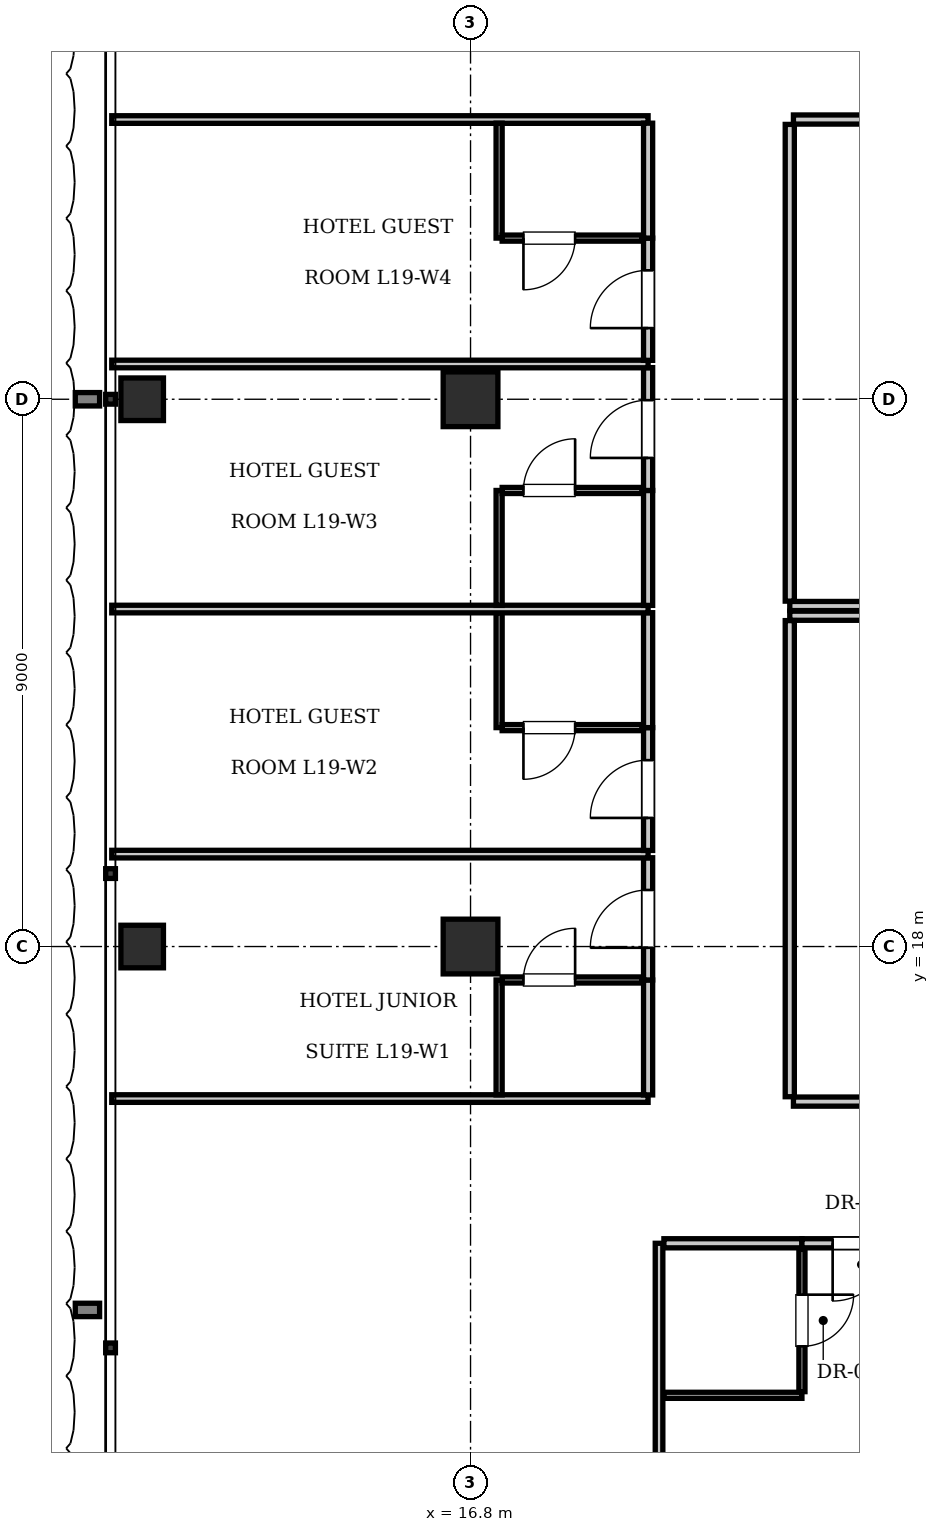
"""IFC4 building model, lengths in metres.
Left out: names, types, materials, properties, quantities, classifications, styles, units other than length and angle.
Written with IfcOpenShell. Run it as: python <this file> out.ifc"""

import sys

from ifc_helpers import new_model, si_unit, direction, frame, frame_2d, origin, origin_2d, place, context, subcontext, project, spatial, rectangle, i_section, extrude, element, fill, save


model = new_model("IFC4")
c1 = context("Model", 3, precision=1e-05, world=origin(), true_north=direction((0.0, 1.0)))
c2 = subcontext(c1, "Body", "Model", "MODEL_VIEW")
j1 = project(units=[si_unit("LENGTHUNIT", "METRE"), si_unit("PLANEANGLEUNIT", "RADIAN")], contexts=[c1])
p1 = place(None, origin())
s1 = spatial("IfcSite", under=j1, at=p1, CompositionType="ELEMENT")
p2 = place(p1, origin())
s2 = spatial("IfcBuilding", under=s1, at=p2, CompositionType="ELEMENT")
p3 = place(p2, frame((0.0, 0.0, 80.85)))
s3 = spatial("IfcBuildingStorey", under=s2, at=p3, CompositionType="ELEMENT", Elevation=80.85)
for number, where, z_axis, x_axis in (
    (1, (16.8, 18.0, 0.0), (0.0, 0.0, 1.0), (1.0, 0.0, 0.0)),
    (2, (16.8, 27.0, 0.0), (0.0, 0.0, 1.0), (1.0, 0.0, 0.0)),
):
    element("IfcColumn", number, at=place(p3, frame(where, z_axis=z_axis, x_axis=x_axis)), inside=s3, PredefinedType="COLUMN", context=c2, shape_type="SweptSolid", body=[
        extrude(rectangle(XDim=0.9, YDim=0.9, at=origin_2d()), origin(), (0.0, 0.0, 1.0), 3.85),
    ])
for number, where, z_axis, x_axis in (
    (3, (11.4, 18.0, 0.0), (0.0, 0.0, 1.0), (1.0, 0.0, 0.0)),
    (4, (11.4, 27.0, 0.0), (0.0, 0.0, 1.0), (1.0, 0.0, 0.0)),
):
    element("IfcColumn", number, at=place(p3, frame(where, z_axis=z_axis, x_axis=x_axis)), inside=s3, PredefinedType="COLUMN", context=c2, shape_type="SweptSolid", body=[
        extrude(i_section(OverallWidth=0.7, OverallDepth=0.7, WebThickness=0.028, FlangeThickness=0.044, at=origin_2d()), origin(), (0.0, 0.0, 1.0), 3.85),
    ])
p4 = place(p3, frame((22.05, 23.6, 0.0), z_axis=(0.0, 0.0, 1.0), x_axis=(1.0, 0.0, 0.0)))
e5 = element("IfcWall", 5, at=p4, inside=s3, PredefinedType="PARTITIONING", context=c2, shape_type="SweptSolid", body=[
    extrude(rectangle(XDim=31.5, YDim=0.15, at=frame_2d((15.75, 0.0))), origin(), (0.0, 0.0, 1.0), 3.61),
])
p5 = place(p3, frame((22.05, 23.68, 0.0), z_axis=(0.0, 0.0, 1.0), x_axis=(0.0, 1.0, 0.0)))
e6 = element("IfcWall", 6, at=p5, inside=s3, PredefinedType="PARTITIONING", context=c2, shape_type="SweptSolid", body=[
    extrude(rectangle(XDim=7.84, YDim=0.15, at=frame_2d((3.92, 0.0))), origin(), (0.0, 0.0, 1.0), 3.61),
])
p6 = place(p3, frame((22.11, 31.6, 0.0), z_axis=(0.0, 0.0, 1.0), x_axis=(1.0, 0.0, 0.0)))
e7 = element("IfcWall", 7, at=p6, inside=s3, PredefinedType="PARTITIONING", context=c2, shape_type="SweptSolid", body=[
    extrude(rectangle(XDim=4.95, YDim=0.15, at=frame_2d((2.475, 0.0))), origin(), (0.0, 0.0, 1.0), 3.61),
])
p7 = place(p6, frame((2.025, 0.0, 0.0)))
e8 = element("IfcOpeningElement", 8, at=p7, cuts=e7, PredefinedType="OPENING", context=c2, shape_type="SweptSolid", body=[
    extrude(rectangle(XDim=0.9, YDim=2.1, at=frame_2d((0.45, 1.05))), frame((0.0, 0.085, 0.0), z_axis=(0.0, -1.0, 0.0), x_axis=(1.0, 0.0, 0.0)), (0.0, 0.0, 1.0), 0.17),
])
p8 = place(p3, frame((22.05, 23.44, 0.0), z_axis=(0.0, 0.0, 1.0), x_axis=(1.0, 0.0, 0.0)))
e9 = element("IfcWall", 9, at=p8, inside=s3, PredefinedType="PARTITIONING", context=c2, shape_type="SweptSolid", body=[
    extrude(rectangle(XDim=31.5, YDim=0.15, at=frame_2d((15.75, 0.0))), origin(), (0.0, 0.0, 1.0), 3.61),
])
p9 = place(p3, frame((22.05, 15.53, 0.0), z_axis=(0.0, 0.0, 1.0), x_axis=(0.0, 1.0, 0.0)))
e10 = element("IfcWall", 10, at=p9, inside=s3, PredefinedType="PARTITIONING", context=c2, shape_type="SweptSolid", body=[
    extrude(rectangle(XDim=7.83, YDim=0.15, at=frame_2d((3.915, 0.0))), origin(), (0.0, 0.0, 1.0), 3.61),
])
p10 = place(p3, frame((22.11, 15.45, 0.0), z_axis=(0.0, 0.0, 1.0), x_axis=(1.0, 0.0, 0.0)))
e11 = element("IfcWall", 11, at=p10, inside=s3, PredefinedType="PARTITIONING", context=c2, shape_type="SweptSolid", body=[
    extrude(rectangle(XDim=7.155, YDim=0.15, at=frame_2d((3.577, 0.0))), origin(), (0.0, 0.0, 1.0), 3.61),
])
p11 = place(p10, frame((3.127, 0.0, 0.0)))
e12 = element("IfcOpeningElement", 12, at=p11, cuts=e11, PredefinedType="OPENING", context=c2, shape_type="SweptSolid", body=[
    extrude(rectangle(XDim=0.9, YDim=2.1, at=frame_2d((0.45, 1.05))), frame((0.0, 0.085, 0.0), z_axis=(0.0, -1.0, 0.0), x_axis=(1.0, 0.0, 0.0)), (0.0, 0.0, 1.0), 0.17),
])
p12 = place(p3, frame((19.9, 0.1, 0.0), z_axis=(0.0, 0.0, 1.0), x_axis=(0.0, 1.0, 0.0)))
e13 = element("IfcWall", 13, at=p12, inside=s3, PredefinedType="PARTITIONING", context=c2, shape_type="SweptSolid", body=[
    extrude(rectangle(XDim=13.02, YDim=0.125, at=frame_2d((6.51, 0.0))), origin(), (0.0, 0.0, 1.0), 3.61),
])
p13 = place(p3, frame((19.98, 13.12, 0.0), z_axis=(0.0, 0.0, 1.0), x_axis=(1.0, 0.0, 0.0)))
e14 = element("IfcWall", 14, at=p13, inside=s3, PredefinedType="PARTITIONING", context=c2, shape_type="SweptSolid", body=[
    extrude(rectangle(XDim=2.27, YDim=0.15, at=frame_2d((1.135, 0.0))), origin(), (0.0, 0.0, 1.0), 3.61),
])
p14 = place(p3, frame((19.98, 10.62, 0.0), z_axis=(0.0, 0.0, 1.0), x_axis=(1.0, 0.0, 0.0)))
e15 = element("IfcWall", 15, at=p14, inside=s3, PredefinedType="PARTITIONING", context=c2, shape_type="SweptSolid", body=[
    extrude(rectangle(XDim=2.27, YDim=0.1, at=frame_2d((1.135, 0.0))), origin(), (0.0, 0.0, 1.0), 3.61),
])
p15 = place(p3, frame((22.25, 10.68, 0.0), z_axis=(0.0, 0.0, 1.0), x_axis=(0.0, 1.0, 0.0)))
e16 = element("IfcWall", 16, at=p15, inside=s3, PredefinedType="PARTITIONING", context=c2, shape_type="SweptSolid", body=[
    extrude(rectangle(XDim=2.34, YDim=0.1, at=frame_2d((1.17, 0.0))), origin(), (0.0, 0.0, 1.0), 3.61),
])
p16 = place(p15, frame((0.745, 0.0, 0.0)))
e17 = element("IfcOpeningElement", 17, at=p16, cuts=e16, PredefinedType="OPENING", context=c2, shape_type="SweptSolid", body=[
    extrude(rectangle(XDim=0.85, YDim=2.1, at=frame_2d((0.425, 1.05))), frame((0.0, 0.06, 0.0), z_axis=(0.0, -1.0, 0.0), x_axis=(1.0, 0.0, 0.0)), (0.0, 0.0, 1.0), 0.12),
])
p17 = place(p3, frame((22.25, 13.12, 0.0), z_axis=(0.0, 0.0, 1.0), x_axis=(1.0, 0.0, 0.0)))
e18 = element("IfcWall", 18, at=p17, inside=s3, PredefinedType="PARTITIONING", context=c2, shape_type="SweptSolid", body=[
    extrude(rectangle(XDim=1.96, YDim=0.15, at=frame_2d((0.98, 0.0))), origin(), (0.0, 0.0, 1.0), 3.61),
])
p18 = place(p17, frame((0.505, 0.0, 0.0)))
e19 = element("IfcOpeningElement", 19, at=p18, cuts=e18, PredefinedType="OPENING", context=c2, shape_type="SweptSolid", body=[
    extrude(rectangle(XDim=0.95, YDim=2.15, at=frame_2d((0.475, 1.075))), frame((0.0, 0.085, 0.0), z_axis=(0.0, -1.0, 0.0), x_axis=(1.0, 0.0, 0.0)), (0.0, 0.0, 1.0), 0.17),
])
for number, where, z_axis, x_axis in (
    (20, (10.9, 15.5, 0.0), (0.0, 0.0, 1.0), (1.0, 0.0, 0.0)),
    (21, (10.9, 31.6, 0.0), (0.0, 0.0, 1.0), (1.0, 0.0, 0.0)),
):
    element("IfcWall", number, at=place(p3, frame(where, z_axis=z_axis, x_axis=x_axis)), inside=s3, PredefinedType="PARTITIONING", context=c2, shape_type="SweptSolid", body=[
        extrude(rectangle(XDim=8.82, YDim=0.125, at=frame_2d((4.41, 0.0))), origin(), (0.0, 0.0, 1.0), 3.61),
    ])
p19 = place(p3, frame((19.72, 15.56, 0.0), z_axis=(0.0, 0.0, 1.0), x_axis=(0.0, 1.0, 0.0)))
e22 = element("IfcWall", 22, at=p19, inside=s3, PredefinedType="PARTITIONING", context=c2, shape_type="SweptSolid", body=[
    extrude(rectangle(XDim=1.89, YDim=0.15, at=frame_2d((0.945, 0.0))), origin(), (0.0, 0.0, 1.0), 3.61),
])
p20 = place(p3, frame((19.72, 17.45, 0.0), z_axis=(0.0, 0.0, 1.0), x_axis=(0.0, 1.0, 0.0)))
e23 = element("IfcWall", 23, at=p20, inside=s3, PredefinedType="PARTITIONING", context=c2, shape_type="SweptSolid", body=[
    extrude(rectangle(XDim=2.01, YDim=0.15, at=frame_2d((1.005, 0.0))), origin(), (0.0, 0.0, 1.0), 3.61),
])
p21 = place(p20, frame((0.53, 0.0, 0.0)))
e24 = element("IfcOpeningElement", 24, at=p21, cuts=e23, PredefinedType="OPENING", context=c2, shape_type="SweptSolid", body=[
    extrude(rectangle(XDim=0.95, YDim=2.15, at=frame_2d((0.475, 1.075))), frame((0.0, 0.085, 0.0), z_axis=(0.0, -1.0, 0.0), x_axis=(1.0, 0.0, 0.0)), (0.0, 0.0, 1.0), 0.17),
])
p22 = place(p3, frame((17.27, 15.56, 0.0), z_axis=(0.0, 0.0, 1.0), x_axis=(0.0, 1.0, 0.0)))
e25 = element("IfcWall", 25, at=p22, inside=s3, PredefinedType="PARTITIONING", context=c2, shape_type="SweptSolid", body=[
    extrude(rectangle(XDim=1.89, YDim=0.1, at=frame_2d((0.945, 0.0))), origin(), (0.0, 0.0, 1.0), 3.61),
])
p23 = place(p3, frame((17.32, 17.45, 0.0), z_axis=(0.0, 0.0, 1.0), x_axis=(1.0, 0.0, 0.0)))
e26 = element("IfcWall", 26, at=p23, inside=s3, PredefinedType="PARTITIONING", context=c2, shape_type="SweptSolid", body=[
    extrude(rectangle(XDim=2.3, YDim=0.1, at=frame_2d((1.15, 0.0))), origin(), (0.0, 0.0, 1.0), 3.61),
])
p24 = place(p23, frame((0.35, 0.0, 0.0)))
e27 = element("IfcOpeningElement", 27, at=p24, cuts=e26, PredefinedType="OPENING", context=c2, shape_type="SweptSolid", body=[
    extrude(rectangle(XDim=0.85, YDim=2.1, at=frame_2d((0.425, 1.05))), frame((0.0, 0.06, 0.0), z_axis=(0.0, -1.0, 0.0), x_axis=(1.0, 0.0, 0.0)), (0.0, 0.0, 1.0), 0.12),
])
p25 = place(p3, frame((10.9, 19.52, 0.0), z_axis=(0.0, 0.0, 1.0), x_axis=(1.0, 0.0, 0.0)))
e28 = element("IfcWall", 28, at=p25, inside=s3, PredefinedType="PARTITIONING", context=c2, shape_type="SweptSolid", body=[
    extrude(rectangle(XDim=8.82, YDim=0.125, at=frame_2d((4.41, 0.0))), origin(), (0.0, 0.0, 1.0), 3.61),
])
p26 = place(p3, frame((19.72, 19.58, 0.0), z_axis=(0.0, 0.0, 1.0), x_axis=(0.0, 1.0, 0.0)))
e29 = element("IfcWall", 29, at=p26, inside=s3, PredefinedType="PARTITIONING", context=c2, shape_type="SweptSolid", body=[
    extrude(rectangle(XDim=2.02, YDim=0.15, at=frame_2d((1.01, 0.0))), origin(), (0.0, 0.0, 1.0), 3.61),
])
p27 = place(p26, frame((0.535, 0.0, 0.0)))
e30 = element("IfcOpeningElement", 30, at=p27, cuts=e29, PredefinedType="OPENING", context=c2, shape_type="SweptSolid", body=[
    extrude(rectangle(XDim=0.95, YDim=2.15, at=frame_2d((0.475, 1.075))), frame((0.0, 0.085, 0.0), z_axis=(0.0, -1.0, 0.0), x_axis=(1.0, 0.0, 0.0)), (0.0, 0.0, 1.0), 0.17),
])
p28 = place(p3, frame((19.72, 21.6, 0.0), z_axis=(0.0, 0.0, 1.0), x_axis=(0.0, 1.0, 0.0)))
e31 = element("IfcWall", 31, at=p28, inside=s3, PredefinedType="PARTITIONING", context=c2, shape_type="SweptSolid", body=[
    extrude(rectangle(XDim=1.89, YDim=0.15, at=frame_2d((0.945, 0.0))), origin(), (0.0, 0.0, 1.0), 3.61),
])
p29 = place(p3, frame((17.27, 21.6, 0.0), z_axis=(0.0, 0.0, 1.0), x_axis=(0.0, 1.0, 0.0)))
e32 = element("IfcWall", 32, at=p29, inside=s3, PredefinedType="PARTITIONING", context=c2, shape_type="SweptSolid", body=[
    extrude(rectangle(XDim=1.89, YDim=0.1, at=frame_2d((0.945, 0.0))), origin(), (0.0, 0.0, 1.0), 3.61),
])
p30 = place(p3, frame((17.32, 21.6, 0.0), z_axis=(0.0, 0.0, 1.0), x_axis=(1.0, 0.0, 0.0)))
e33 = element("IfcWall", 33, at=p30, inside=s3, PredefinedType="PARTITIONING", context=c2, shape_type="SweptSolid", body=[
    extrude(rectangle(XDim=2.3, YDim=0.1, at=frame_2d((1.15, 0.0))), origin(), (0.0, 0.0, 1.0), 3.61),
])
p31 = place(p30, frame((0.35, 0.0, 0.0)))
e34 = element("IfcOpeningElement", 34, at=p31, cuts=e33, PredefinedType="OPENING", context=c2, shape_type="SweptSolid", body=[
    extrude(rectangle(XDim=0.85, YDim=2.1, at=frame_2d((0.425, 1.05))), frame((0.0, 0.06, 0.0), z_axis=(0.0, -1.0, 0.0), x_axis=(1.0, 0.0, 0.0)), (0.0, 0.0, 1.0), 0.12),
])
p32 = place(p3, frame((10.9, 23.55, 0.0), z_axis=(0.0, 0.0, 1.0), x_axis=(1.0, 0.0, 0.0)))
e35 = element("IfcWall", 35, at=p32, inside=s3, PredefinedType="PARTITIONING", context=c2, shape_type="SweptSolid", body=[
    extrude(rectangle(XDim=8.82, YDim=0.125, at=frame_2d((4.41, 0.0))), origin(), (0.0, 0.0, 1.0), 3.61),
])
p33 = place(p3, frame((19.72, 23.61, 0.0), z_axis=(0.0, 0.0, 1.0), x_axis=(0.0, 1.0, 0.0)))
e36 = element("IfcWall", 36, at=p33, inside=s3, PredefinedType="PARTITIONING", context=c2, shape_type="SweptSolid", body=[
    extrude(rectangle(XDim=1.89, YDim=0.15, at=frame_2d((0.945, 0.0))), origin(), (0.0, 0.0, 1.0), 3.61),
])
p34 = place(p3, frame((19.72, 25.5, 0.0), z_axis=(0.0, 0.0, 1.0), x_axis=(0.0, 1.0, 0.0)))
e37 = element("IfcWall", 37, at=p34, inside=s3, PredefinedType="PARTITIONING", context=c2, shape_type="SweptSolid", body=[
    extrude(rectangle(XDim=2.02, YDim=0.15, at=frame_2d((1.01, 0.0))), origin(), (0.0, 0.0, 1.0), 3.61),
])
p35 = place(p34, frame((0.535, 0.0, 0.0)))
e38 = element("IfcOpeningElement", 38, at=p35, cuts=e37, PredefinedType="OPENING", context=c2, shape_type="SweptSolid", body=[
    extrude(rectangle(XDim=0.95, YDim=2.15, at=frame_2d((0.475, 1.075))), frame((0.0, 0.085, 0.0), z_axis=(0.0, -1.0, 0.0), x_axis=(1.0, 0.0, 0.0)), (0.0, 0.0, 1.0), 0.17),
])
p36 = place(p3, frame((17.27, 23.61, 0.0), z_axis=(0.0, 0.0, 1.0), x_axis=(0.0, 1.0, 0.0)))
e39 = element("IfcWall", 39, at=p36, inside=s3, PredefinedType="PARTITIONING", context=c2, shape_type="SweptSolid", body=[
    extrude(rectangle(XDim=1.89, YDim=0.1, at=frame_2d((0.945, 0.0))), origin(), (0.0, 0.0, 1.0), 3.61),
])
p37 = place(p3, frame((17.32, 25.5, 0.0), z_axis=(0.0, 0.0, 1.0), x_axis=(1.0, 0.0, 0.0)))
e40 = element("IfcWall", 40, at=p37, inside=s3, PredefinedType="PARTITIONING", context=c2, shape_type="SweptSolid", body=[
    extrude(rectangle(XDim=2.3, YDim=0.1, at=frame_2d((1.15, 0.0))), origin(), (0.0, 0.0, 1.0), 3.61),
])
p38 = place(p37, frame((0.35, 0.0, 0.0)))
e41 = element("IfcOpeningElement", 41, at=p38, cuts=e40, PredefinedType="OPENING", context=c2, shape_type="SweptSolid", body=[
    extrude(rectangle(XDim=0.85, YDim=2.1, at=frame_2d((0.425, 1.05))), frame((0.0, 0.06, 0.0), z_axis=(0.0, -1.0, 0.0), x_axis=(1.0, 0.0, 0.0)), (0.0, 0.0, 1.0), 0.12),
])
p39 = place(p3, frame((10.9, 27.58, 0.0), z_axis=(0.0, 0.0, 1.0), x_axis=(1.0, 0.0, 0.0)))
e42 = element("IfcWall", 42, at=p39, inside=s3, PredefinedType="PARTITIONING", context=c2, shape_type="SweptSolid", body=[
    extrude(rectangle(XDim=8.82, YDim=0.125, at=frame_2d((4.41, 0.0))), origin(), (0.0, 0.0, 1.0), 3.61),
])
p40 = place(p3, frame((19.72, 27.64, 0.0), z_axis=(0.0, 0.0, 1.0), x_axis=(0.0, 1.0, 0.0)))
e43 = element("IfcWall", 43, at=p40, inside=s3, PredefinedType="PARTITIONING", context=c2, shape_type="SweptSolid", body=[
    extrude(rectangle(XDim=2.01, YDim=0.15, at=frame_2d((1.005, 0.0))), origin(), (0.0, 0.0, 1.0), 3.61),
])
p41 = place(p40, frame((0.53, 0.0, 0.0)))
e44 = element("IfcOpeningElement", 44, at=p41, cuts=e43, PredefinedType="OPENING", context=c2, shape_type="SweptSolid", body=[
    extrude(rectangle(XDim=0.95, YDim=2.15, at=frame_2d((0.475, 1.075))), frame((0.0, 0.085, 0.0), z_axis=(0.0, -1.0, 0.0), x_axis=(1.0, 0.0, 0.0)), (0.0, 0.0, 1.0), 0.17),
])
p42 = place(p3, frame((19.72, 29.65, 0.0), z_axis=(0.0, 0.0, 1.0), x_axis=(0.0, 1.0, 0.0)))
e45 = element("IfcWall", 45, at=p42, inside=s3, PredefinedType="PARTITIONING", context=c2, shape_type="SweptSolid", body=[
    extrude(rectangle(XDim=1.89, YDim=0.15, at=frame_2d((0.945, 0.0))), origin(), (0.0, 0.0, 1.0), 3.61),
])
p43 = place(p3, frame((17.27, 29.65, 0.0), z_axis=(0.0, 0.0, 1.0), x_axis=(0.0, 1.0, 0.0)))
e46 = element("IfcWall", 46, at=p43, inside=s3, PredefinedType="PARTITIONING", context=c2, shape_type="SweptSolid", body=[
    extrude(rectangle(XDim=1.89, YDim=0.1, at=frame_2d((0.945, 0.0))), origin(), (0.0, 0.0, 1.0), 3.61),
])
p44 = place(p3, frame((17.32, 29.65, 0.0), z_axis=(0.0, 0.0, 1.0), x_axis=(1.0, 0.0, 0.0)))
e47 = element("IfcWall", 47, at=p44, inside=s3, PredefinedType="PARTITIONING", context=c2, shape_type="SweptSolid", body=[
    extrude(rectangle(XDim=2.3, YDim=0.1, at=frame_2d((1.15, 0.0))), origin(), (0.0, 0.0, 1.0), 3.61),
])
p45 = place(p44, frame((0.35, 0.0, 0.0)))
e48 = element("IfcOpeningElement", 48, at=p45, cuts=e47, PredefinedType="OPENING", context=c2, shape_type="SweptSolid", body=[
    extrude(rectangle(XDim=0.85, YDim=2.1, at=frame_2d((0.425, 1.05))), frame((0.0, 0.06, 0.0), z_axis=(0.0, -1.0, 0.0), x_axis=(1.0, 0.0, 0.0)), (0.0, 0.0, 1.0), 0.12),
])
p46 = place(p16, frame((0.85, 0.0, 0.0), z_axis=(0.0, 0.0, 1.0), x_axis=(-1.0, 0.0, 0.0)))
e49 = element("IfcDoor", 49, at=p46, inside=s3, OperationType="SINGLE_SWING_LEFT", PredefinedType="DOOR", context=c2, shape_type="SweptSolid", body=[
    extrude(rectangle(XDim=0.85, YDim=2.1, at=frame_2d((0.425, 1.05))), frame((0.0, 0.025, 0.0), z_axis=(0.0, -1.0, 0.0), x_axis=(1.0, 0.0, 0.0)), (0.0, 0.0, 1.0), 0.05),
])
fill(e17, e49)
p47 = place(p18, frame((0.95, 0.0, 0.0), z_axis=(0.0, 0.0, 1.0), x_axis=(-1.0, 0.0, 0.0)))
e50 = element("IfcDoor", 50, at=p47, inside=s3, OperationType="SINGLE_SWING_RIGHT", PredefinedType="DOOR", context=c2, shape_type="SweptSolid", body=[
    extrude(rectangle(XDim=0.95, YDim=2.15, at=frame_2d((0.475, 1.075))), frame((0.0, 0.025, 0.0), z_axis=(0.0, -1.0, 0.0), x_axis=(1.0, 0.0, 0.0)), (0.0, 0.0, 1.0), 0.05),
])
fill(e19, e50)
p48 = place(p24, origin())
e51 = element("IfcDoor", 51, at=p48, inside=s3, OperationType="SINGLE_SWING_RIGHT", PredefinedType="DOOR", context=c2, shape_type="SweptSolid", body=[
    extrude(rectangle(XDim=0.85, YDim=2.1, at=frame_2d((0.425, 1.05))), frame((0.0, 0.025, 0.0), z_axis=(0.0, -1.0, 0.0), x_axis=(1.0, 0.0, 0.0)), (0.0, 0.0, 1.0), 0.05),
])
fill(e27, e51)
p49 = place(p21, origin())
e52 = element("IfcDoor", 52, at=p49, inside=s3, OperationType="SINGLE_SWING_LEFT", PredefinedType="DOOR", context=c2, shape_type="SweptSolid", body=[
    extrude(rectangle(XDim=0.95, YDim=2.15, at=frame_2d((0.475, 1.075))), frame((0.0, 0.025, 0.0), z_axis=(0.0, -1.0, 0.0), x_axis=(1.0, 0.0, 0.0)), (0.0, 0.0, 1.0), 0.05),
])
fill(e24, e52)
p50 = place(p31, frame((0.85, 0.0, 0.0), z_axis=(0.0, 0.0, 1.0), x_axis=(-1.0, 0.0, 0.0)))
e53 = element("IfcDoor", 53, at=p50, inside=s3, OperationType="SINGLE_SWING_RIGHT", PredefinedType="DOOR", context=c2, shape_type="SweptSolid", body=[
    extrude(rectangle(XDim=0.85, YDim=2.1, at=frame_2d((0.425, 1.05))), frame((0.0, 0.025, 0.0), z_axis=(0.0, -1.0, 0.0), x_axis=(1.0, 0.0, 0.0)), (0.0, 0.0, 1.0), 0.05),
])
fill(e34, e53)
p51 = place(p27, origin())
e54 = element("IfcDoor", 54, at=p51, inside=s3, OperationType="SINGLE_SWING_LEFT", PredefinedType="DOOR", context=c2, shape_type="SweptSolid", body=[
    extrude(rectangle(XDim=0.95, YDim=2.15, at=frame_2d((0.475, 1.075))), frame((0.0, 0.025, 0.0), z_axis=(0.0, -1.0, 0.0), x_axis=(1.0, 0.0, 0.0)), (0.0, 0.0, 1.0), 0.05),
])
fill(e30, e54)
p52 = place(p38, origin())
e55 = element("IfcDoor", 55, at=p52, inside=s3, OperationType="SINGLE_SWING_RIGHT", PredefinedType="DOOR", context=c2, shape_type="SweptSolid", body=[
    extrude(rectangle(XDim=0.85, YDim=2.1, at=frame_2d((0.425, 1.05))), frame((0.0, 0.025, 0.0), z_axis=(0.0, -1.0, 0.0), x_axis=(1.0, 0.0, 0.0)), (0.0, 0.0, 1.0), 0.05),
])
fill(e41, e55)
p53 = place(p35, origin())
e56 = element("IfcDoor", 56, at=p53, inside=s3, OperationType="SINGLE_SWING_LEFT", PredefinedType="DOOR", context=c2, shape_type="SweptSolid", body=[
    extrude(rectangle(XDim=0.95, YDim=2.15, at=frame_2d((0.475, 1.075))), frame((0.0, 0.025, 0.0), z_axis=(0.0, -1.0, 0.0), x_axis=(1.0, 0.0, 0.0)), (0.0, 0.0, 1.0), 0.05),
])
fill(e38, e56)
p54 = place(p45, frame((0.85, 0.0, 0.0), z_axis=(0.0, 0.0, 1.0), x_axis=(-1.0, 0.0, 0.0)))
e57 = element("IfcDoor", 57, at=p54, inside=s3, OperationType="SINGLE_SWING_RIGHT", PredefinedType="DOOR", context=c2, shape_type="SweptSolid", body=[
    extrude(rectangle(XDim=0.85, YDim=2.1, at=frame_2d((0.425, 1.05))), frame((0.0, 0.025, 0.0), z_axis=(0.0, -1.0, 0.0), x_axis=(1.0, 0.0, 0.0)), (0.0, 0.0, 1.0), 0.05),
])
fill(e48, e57)
p55 = place(p41, origin())
e58 = element("IfcDoor", 58, at=p55, inside=s3, OperationType="SINGLE_SWING_LEFT", PredefinedType="DOOR", context=c2, shape_type="SweptSolid", body=[
    extrude(rectangle(XDim=0.95, YDim=2.15, at=frame_2d((0.475, 1.075))), frame((0.0, 0.025, 0.0), z_axis=(0.0, -1.0, 0.0), x_axis=(1.0, 0.0, 0.0)), (0.0, 0.0, 1.0), 0.05),
])
fill(e44, e58)
save(model, sys.argv[1])
